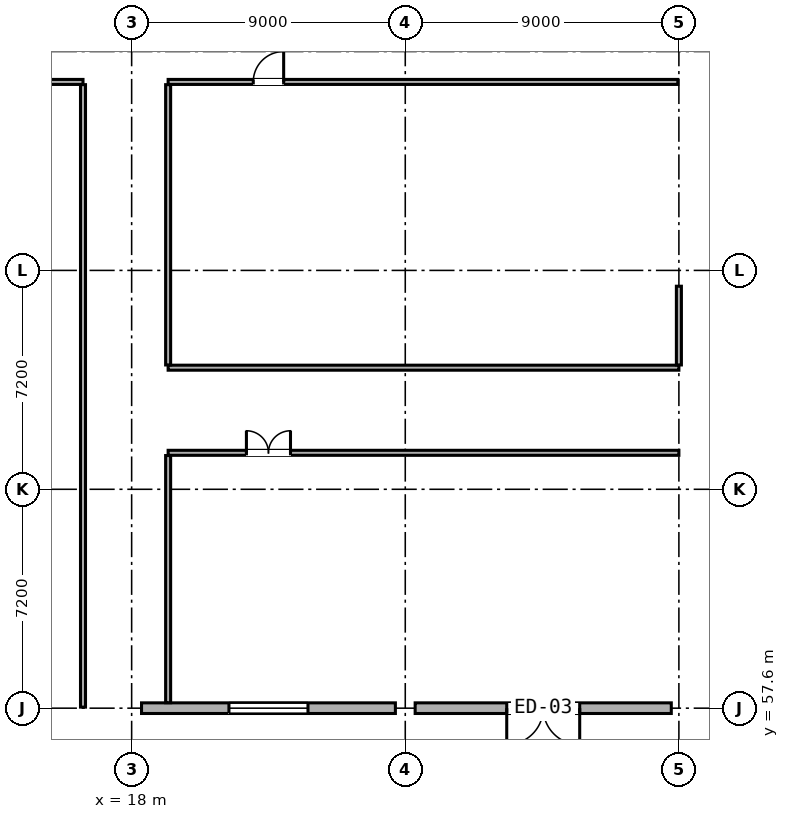
"""IFC4 building model, lengths in metres.
Left out: names, types, materials, properties, quantities, classifications, styles, units other than length and angle.
Written with IfcOpenShell. Run it as: python <this file> out.ifc"""

import sys

from ifc_helpers import new_model, si_unit, direction, frame, frame_2d, origin, origin_2d, place, context, subcontext, project, spatial, rectangle, hollow_rectangle, extrude, element, fill, save


model = new_model("IFC4")
c1 = context("Model", 3, precision=1e-05, world=origin(), true_north=direction((0.0, 1.0)))
c2 = subcontext(c1, "Body", "Model", "MODEL_VIEW")
j1 = project(units=[si_unit("LENGTHUNIT", "METRE"), si_unit("PLANEANGLEUNIT", "RADIAN")], contexts=[c1])
p1 = place(None, origin())
s1 = spatial("IfcSite", under=j1, at=p1, CompositionType="ELEMENT")
p2 = place(p1, origin())
s2 = spatial("IfcBuilding", under=s1, at=p2, CompositionType="ELEMENT")
p3 = place(p2, origin())
s3 = spatial("IfcBuildingStorey", under=s2, at=p3, CompositionType="ELEMENT", Elevation=0.0)
for number, where, z_axis, x_axis in (
    (1, (18.0, 57.6, 0.0), (0.0, 0.0, 1.0), (1.0, 0.0, 0.0)),
    (2, (18.0, 64.8, 0.0), (0.0, 0.0, 1.0), (1.0, 0.0, 0.0)),
    (3, (18.0, 72.0, 0.0), (0.0, 0.0, 1.0), (1.0, 0.0, 0.0)),
    (4, (18.0, 79.2, 0.0), (0.0, 0.0, 1.0), (1.0, 0.0, 0.0)),
    (5, (27.0, 57.6, 0.0), (0.0, 0.0, 1.0), (1.0, 0.0, 0.0)),
    (6, (27.0, 64.8, 0.0), (0.0, 0.0, 1.0), (1.0, 0.0, 0.0)),
    (7, (27.0, 72.0, 0.0), (0.0, 0.0, 1.0), (1.0, 0.0, 0.0)),
    (8, (27.0, 79.2, 0.0), (0.0, 0.0, 1.0), (1.0, 0.0, 0.0)),
):
    element("IfcColumn", number, at=place(p3, frame(where, z_axis=z_axis, x_axis=x_axis)), inside=s3, PredefinedType="COLUMN", context=c2, shape_type="SweptSolid", body=[
        extrude(hollow_rectangle(XDim=0.65, YDim=0.65, WallThickness=0.025, at=origin_2d()), origin(), (0.0, 0.0, 1.0), 4.8),
    ])
for number, where, z_axis, x_axis in (
    (9, (36.0, 57.6, 0.0), (0.0, 0.0, 1.0), (1.0, 0.0, 0.0)),
    (10, (36.0, 64.8, 0.0), (0.0, 0.0, 1.0), (1.0, 0.0, 0.0)),
    (11, (36.0, 72.0, 0.0), (0.0, 0.0, 1.0), (1.0, 0.0, 0.0)),
    (12, (36.0, 79.2, 0.0), (0.0, 0.0, 1.0), (1.0, 0.0, 0.0)),
):
    element("IfcColumn", number, at=place(p3, frame(where, z_axis=z_axis, x_axis=x_axis)), inside=s3, PredefinedType="COLUMN", context=c2, shape_type="SweptSolid", body=[
        extrude(hollow_rectangle(XDim=0.5, YDim=0.5, WallThickness=0.022, at=origin_2d()), origin(), (0.0, 0.0, 1.0), 4.8),
    ])
p4 = place(p3, frame((18.325, 57.6, 0.0), z_axis=(0.0, 0.0, 1.0), x_axis=(1.0, 0.0, 0.0)))
e13 = element("IfcWall", 13, at=p4, inside=s3, PredefinedType="STANDARD", context=c2, shape_type="SweptSolid", body=[
    extrude(rectangle(XDim=8.35, YDim=0.35, at=frame_2d((4.175, 0.0))), origin(), (0.0, 0.0, 1.0), 4.055),
])
p5 = place(p4, frame((2.875, 0.0, 0.85)))
e14 = element("IfcOpeningElement", 14, at=p5, cuts=e13, PredefinedType="OPENING", context=c2, shape_type="SweptSolid", body=[
    extrude(rectangle(XDim=2.6, YDim=1.6, at=frame_2d((1.3, 0.8))), frame((0.0, 0.187, 0.0), z_axis=(0.0, -1.0, 0.0), x_axis=(1.0, 0.0, 0.0)), (0.0, 0.0, 1.0), 0.374),
])
p6 = place(p3, frame((27.325, 57.6, 0.0), z_axis=(0.0, 0.0, 1.0), x_axis=(1.0, 0.0, 0.0)))
e15 = element("IfcWall", 15, at=p6, inside=s3, PredefinedType="STANDARD", context=c2, shape_type="SweptSolid", body=[
    extrude(rectangle(XDim=8.425, YDim=0.35, at=frame_2d((4.212, 0.0))), origin(), (0.0, 0.0, 1.0), 4.055),
])
p7 = place(p6, frame((3.012, 0.0, 0.0)))
e16 = element("IfcOpeningElement", 16, at=p7, cuts=e15, PredefinedType="OPENING", context=c2, shape_type="SweptSolid", body=[
    extrude(rectangle(XDim=2.4, YDim=2.55, at=frame_2d((1.2, 1.275))), frame((0.0, 0.187, 0.0), z_axis=(0.0, -1.0, 0.0), x_axis=(1.0, 0.0, 0.0)), (0.0, 0.0, 1.0), 0.374),
])
p8 = place(p3, frame((0.18, 78.2, 0.0), z_axis=(0.0, 0.0, 1.0), x_axis=(1.0, 0.0, 0.0)))
e17 = element("IfcWall", 17, at=p8, inside=s3, PredefinedType="PARTITIONING", context=c2, shape_type="SweptSolid", body=[
    extrude(rectangle(XDim=16.22, YDim=0.165, at=frame_2d((8.11, 0.0))), origin(), (0.0, 0.0, 1.0), 4.555),
])
p9 = place(p8, frame((3.47, 0.0, 0.0)))
e18 = element("IfcOpeningElement", 18, at=p9, cuts=e17, PredefinedType="OPENING", context=c2, shape_type="SweptSolid", body=[
    extrude(rectangle(XDim=1.7, YDim=2.12, at=frame_2d((0.85, 1.06))), frame((0.0, 0.094, 0.0), z_axis=(0.0, -1.0, 0.0), x_axis=(1.0, 0.0, 0.0)), (0.0, 0.0, 1.0), 0.189),
])
p10 = place(p3, frame((16.4, 57.635, 0.0), z_axis=(0.0, 0.0, 1.0), x_axis=(0.0, 1.0, 0.0)))
e19 = element("IfcWall", 19, at=p10, inside=s3, PredefinedType="PARTITIONING", context=c2, shape_type="SweptSolid", body=[
    extrude(rectangle(XDim=20.475, YDim=0.165, at=frame_2d((10.238, 0.0))), origin(), (0.0, 0.0, 1.0), 4.555),
])
p11 = place(p3, frame((19.2, 66.0, 0.0), z_axis=(0.0, 0.0, 1.0), x_axis=(1.0, 0.0, 0.0)))
e20 = element("IfcWall", 20, at=p11, inside=s3, PredefinedType="PARTITIONING", context=c2, shape_type="SweptSolid", body=[
    extrude(rectangle(XDim=16.8, YDim=0.165, at=frame_2d((8.4, 0.0))), origin(), (0.0, 0.0, 1.0), 4.555),
])
p12 = place(p11, frame((2.575, 0.0, 0.0)))
e21 = element("IfcOpeningElement", 21, at=p12, cuts=e20, PredefinedType="OPENING", context=c2, shape_type="SweptSolid", body=[
    extrude(rectangle(XDim=1.45, YDim=2.1, at=frame_2d((0.725, 1.05))), frame((0.0, 0.094, 0.0), z_axis=(0.0, -1.0, 0.0), x_axis=(1.0, 0.0, 0.0)), (0.0, 0.0, 1.0), 0.189),
])
p13 = place(p3, frame((19.2, 57.78, 0.0), z_axis=(0.0, 0.0, 1.0), x_axis=(0.0, 1.0, 0.0)))
e22 = element("IfcWall", 22, at=p13, inside=s3, PredefinedType="PARTITIONING", context=c2, shape_type="SweptSolid", body=[
    extrude(rectangle(XDim=8.13, YDim=0.165, at=frame_2d((4.065, 0.0))), origin(), (0.0, 0.0, 1.0), 4.555),
])
p14 = place(p3, frame((19.2, 68.8, 0.0), z_axis=(0.0, 0.0, 1.0), x_axis=(1.0, 0.0, 0.0)))
e23 = element("IfcWall", 23, at=p14, inside=s3, PredefinedType="PARTITIONING", context=c2, shape_type="SweptSolid", body=[
    extrude(rectangle(XDim=16.8, YDim=0.165, at=frame_2d((8.4, 0.0))), origin(), (0.0, 0.0, 1.0), 4.555),
])
p15 = place(p3, frame((19.2, 78.2, 0.0), z_axis=(0.0, 0.0, 1.0), x_axis=(1.0, 0.0, 0.0)))
e24 = element("IfcWall", 24, at=p15, inside=s3, PredefinedType="PARTITIONING", context=c2, shape_type="SweptSolid", body=[
    extrude(rectangle(XDim=16.765, YDim=0.165, at=frame_2d((8.383, 0.0))), origin(), (0.0, 0.0, 1.0), 4.555),
])
p16 = place(p15, frame((2.8, 0.0, 0.0)))
e25 = element("IfcOpeningElement", 25, at=p16, cuts=e24, PredefinedType="OPENING", context=c2, shape_type="SweptSolid", body=[
    extrude(rectangle(XDim=1.0, YDim=2.08, at=frame_2d((0.5, 1.04))), frame((0.0, 0.094, 0.0), z_axis=(0.0, -1.0, 0.0), x_axis=(1.0, 0.0, 0.0)), (0.0, 0.0, 1.0), 0.189),
])
p17 = place(p3, frame((19.2, 68.89, 0.0), z_axis=(0.0, 0.0, 1.0), x_axis=(0.0, 1.0, 0.0)))
e26 = element("IfcWall", 26, at=p17, inside=s3, PredefinedType="PARTITIONING", context=c2, shape_type="SweptSolid", body=[
    extrude(rectangle(XDim=9.22, YDim=0.165, at=frame_2d((4.61, 0.0))), origin(), (0.0, 0.0, 1.0), 4.555),
])
p18 = place(p3, frame((36.0, 68.89, 0.0), z_axis=(0.0, 0.0, 1.0), x_axis=(0.0, 1.0, 0.0)))
e27 = element("IfcWall", 27, at=p18, inside=s3, PredefinedType="PARTITIONING", context=c2, shape_type="SweptSolid", body=[
    extrude(rectangle(XDim=2.59, YDim=0.165, at=frame_2d((1.295, 0.0))), origin(), (0.0, 0.0, 1.0), 3.835),
])
p19 = place(p5, origin())
e28 = element("IfcWindow", 28, at=p19, inside=s3, PartitioningType="DOUBLE_PANEL_VERTICAL", PredefinedType="WINDOW", context=c2, shape_type="SweptSolid", body=[
    extrude(rectangle(XDim=2.6, YDim=1.6, at=frame_2d((1.3, 0.8))), frame((0.0, 0.03, 0.0), z_axis=(0.0, -1.0, 0.0), x_axis=(1.0, 0.0, 0.0)), (0.0, 0.0, 1.0), 0.06),
])
fill(e14, e28)
p20 = place(p7, frame((2.4, 0.0, 0.0), z_axis=(0.0, 0.0, 1.0), x_axis=(-1.0, 0.0, 0.0)))
e29 = element("IfcDoor", 29, at=p20, inside=s3, OperationType="DOUBLE_DOOR_SINGLE_SWING", PredefinedType="DOOR", context=c2, shape_type="SweptSolid", body=[
    extrude(rectangle(XDim=2.4, YDim=2.55, at=frame_2d((1.2, 1.275))), frame((0.0, 0.025, 0.0), z_axis=(0.0, -1.0, 0.0), x_axis=(1.0, 0.0, 0.0)), (0.0, 0.0, 1.0), 0.05),
])
fill(e16, e29)
p21 = place(p12, origin())
e30 = element("IfcDoor", 30, at=p21, inside=s3, OperationType="DOUBLE_DOOR_SINGLE_SWING", PredefinedType="DOOR", context=c2, shape_type="SweptSolid", body=[
    extrude(rectangle(XDim=1.45, YDim=2.1, at=frame_2d((0.725, 1.05))), frame((0.0, 0.025, 0.0), z_axis=(0.0, -1.0, 0.0), x_axis=(1.0, 0.0, 0.0)), (0.0, 0.0, 1.0), 0.05),
])
fill(e21, e30)
p22 = place(p16, origin())
e31 = element("IfcDoor", 31, at=p22, inside=s3, OperationType="SINGLE_SWING_RIGHT", PredefinedType="DOOR", context=c2, shape_type="SweptSolid", body=[
    extrude(rectangle(XDim=1.0, YDim=2.08, at=frame_2d((0.5, 1.04))), frame((0.0, 0.025, 0.0), z_axis=(0.0, -1.0, 0.0), x_axis=(1.0, 0.0, 0.0)), (0.0, 0.0, 1.0), 0.05),
])
fill(e25, e31)
save(model, sys.argv[1])
